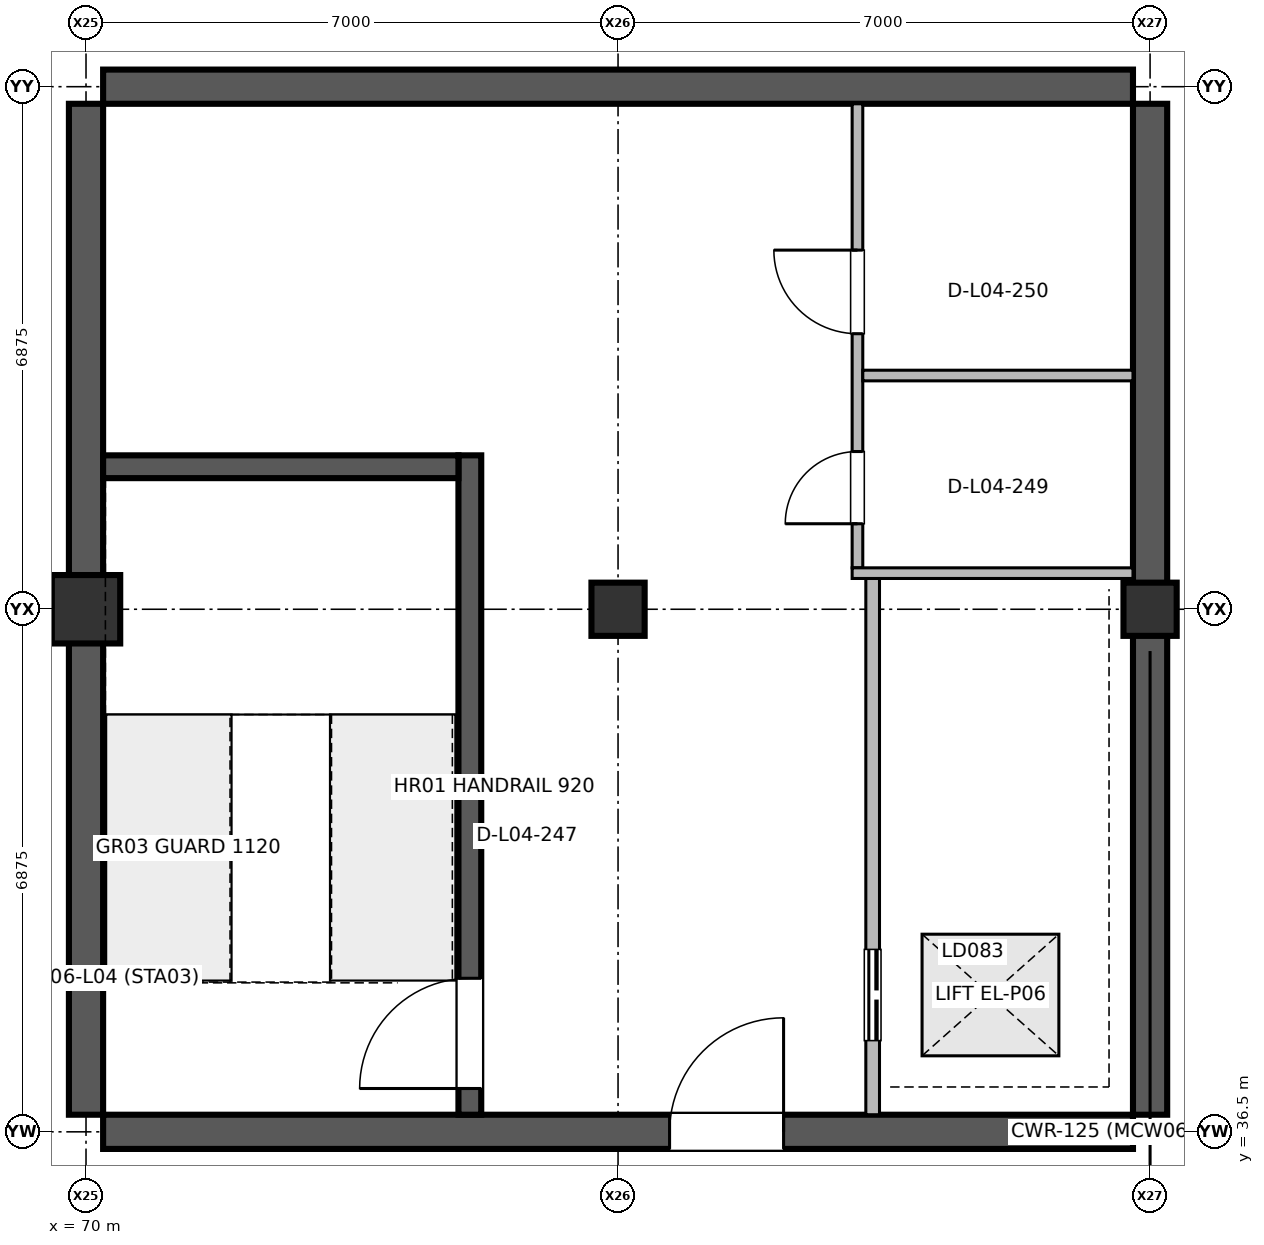
"""IFC4 building model, lengths in metres.
Left out: names, types, materials, properties, quantities, classifications, styles, units other than length and angle.
Written with IfcOpenShell. Run it as: python <this file> out.ifc"""

import sys

from ifc_helpers import new_model, si_unit, direction, frame, frame_2d, origin, origin_2d, place, context, subcontext, project, spatial, rectangle, extrude, element, fill, save


model = new_model("IFC4")
c1 = context("Model", 3, precision=1e-05, world=origin(), true_north=direction((0.0, 1.0)))
c2 = subcontext(c1, "Body", "Model", "MODEL_VIEW")
j1 = project(units=[si_unit("LENGTHUNIT", "METRE"), si_unit("PLANEANGLEUNIT", "RADIAN")], contexts=[c1])
p1 = place(None, origin())
s1 = spatial("IfcSite", under=j1, at=p1, CompositionType="ELEMENT")
p2 = place(p1, origin())
s2 = spatial("IfcBuilding", under=s1, at=p2, CompositionType="ELEMENT")
p3 = place(p2, frame((0.0, 0.0, 16.2)))
s3 = spatial("IfcBuildingStorey", under=s2, at=p3, CompositionType="ELEMENT", Elevation=16.2)
p4 = place(p3, frame((70.0, 43.375, 0.0), z_axis=(0.0, 0.0, 1.0), x_axis=(1.0, 0.0, 0.0)))
e1 = element("IfcColumn", 1, at=p4, inside=s3, PredefinedType="COLUMN", context=c2, shape_type="SweptSolid", body=[
    extrude(rectangle(XDim=0.9, YDim=0.9, at=origin_2d()), origin(), (0.0, 0.0, 1.0), 4.798),
])
p5 = place(p3, frame((77.0, 43.375, 0.0), z_axis=(0.0, 0.0, 1.0), x_axis=(1.0, 0.0, 0.0)))
e2 = element("IfcColumn", 2, at=p5, inside=s3, PredefinedType="COLUMN", context=c2, shape_type="SweptSolid", body=[
    extrude(rectangle(XDim=0.7, YDim=0.7, at=origin_2d()), origin(), (0.0, 0.0, 1.0), 4.6),
])
p6 = place(p3, frame((84.0, 43.375, 0.0), z_axis=(0.0, 0.0, 1.0), x_axis=(1.0, 0.0, 0.0)))
e3 = element("IfcColumn", 3, at=p6, inside=s3, PredefinedType="COLUMN", context=c2, shape_type="SweptSolid", body=[
    extrude(rectangle(XDim=0.7, YDim=0.7, at=origin_2d()), origin(), (0.0, 0.0, 1.0), 4.798),
])
for number, where, z_axis, x_axis in (
    (4, (70.0, 36.725, 0.0), (0.0, 0.0, 1.0), (0.0, 1.0, 0.0)),
    (5, (84.0, 36.725, 0.0), (0.0, 0.0, 1.0), (0.0, 1.0, 0.0)),
):
    element("IfcWall", number, at=place(p3, frame(where, z_axis=z_axis, x_axis=x_axis)), inside=s3, PredefinedType="SHEAR", context=c2, shape_type="SweptSolid", body=[
        extrude(rectangle(XDim=13.3, YDim=0.45, at=frame_2d((6.65, 0.0))), origin(), (0.0, 0.0, 1.0), 4.6),
    ])
p7 = place(p3, frame((70.225, 36.5, 0.0), z_axis=(0.0, 0.0, 1.0), x_axis=(1.0, 0.0, 0.0)))
e6 = element("IfcWall", 6, at=p7, inside=s3, PredefinedType="SHEAR", context=c2, shape_type="SweptSolid", body=[
    extrude(rectangle(XDim=13.55, YDim=0.45, at=frame_2d((6.775, 0.0))), origin(), (0.0, 0.0, 1.0), 4.6),
])
p8 = place(p7, frame((7.453, 0.0, 0.0)))
e7 = element("IfcOpeningElement", 7, at=p8, cuts=e6, PredefinedType="OPENING", context=c2, shape_type="SweptSolid", body=[
    extrude(rectangle(XDim=1.5, YDim=2.2, at=frame_2d((0.75, 1.1))), frame((0.0, 0.235, 0.0), z_axis=(0.0, -1.0, 0.0), x_axis=(1.0, 0.0, 0.0)), (0.0, 0.0, 1.0), 0.47),
])
p9 = place(p3, frame((70.225, 50.25, 0.0), z_axis=(0.0, 0.0, 1.0), x_axis=(1.0, 0.0, 0.0)))
e8 = element("IfcWall", 8, at=p9, inside=s3, PredefinedType="SHEAR", context=c2, shape_type="SweptSolid", body=[
    extrude(rectangle(XDim=13.55, YDim=0.45, at=frame_2d((6.775, 0.0))), origin(), (0.0, 0.0, 1.0), 4.6),
])
p10 = place(p3, frame((75.05, 36.725, 0.0), z_axis=(0.0, 0.0, 1.0), x_axis=(0.0, 1.0, 0.0)))
e9 = element("IfcWall", 9, at=p10, inside=s3, PredefinedType="SHEAR", context=c2, shape_type="SweptSolid", body=[
    extrude(rectangle(XDim=8.675, YDim=0.3, at=frame_2d((4.337, 0.0))), origin(), (0.0, 0.0, 1.0), 4.6),
])
p11 = place(p10, frame((0.345, 0.0, 0.0)))
e10 = element("IfcOpeningElement", 10, at=p11, cuts=e9, PredefinedType="OPENING", context=c2, shape_type="SweptSolid", body=[
    extrude(rectangle(XDim=1.45, YDim=2.2, at=frame_2d((0.725, 1.1))), frame((0.0, 0.16, 0.0), z_axis=(0.0, -1.0, 0.0), x_axis=(1.0, 0.0, 0.0)), (0.0, 0.0, 1.0), 0.32),
])
p12 = place(p3, frame((80.35, 36.725, 0.0), z_axis=(0.0, 0.0, 1.0), x_axis=(0.0, 1.0, 0.0)))
e11 = element("IfcWall", 11, at=p12, inside=s3, PredefinedType="PARTITIONING", context=c2, shape_type="SweptSolid", body=[
    extrude(rectangle(XDim=7.055, YDim=0.18, at=frame_2d((3.527, 0.0))), origin(), (0.0, 0.0, 1.0), 3.82),
])
p13 = place(p12, frame((0.975, 0.0, 0.0)))
e12 = element("IfcOpeningElement", 12, at=p13, cuts=e11, PredefinedType="OPENING", context=c2, shape_type="SweptSolid", body=[
    extrude(rectangle(XDim=1.2, YDim=2.25, at=frame_2d((0.6, 1.125))), frame((0.0, 0.1, 0.0), z_axis=(0.0, -1.0, 0.0), x_axis=(1.0, 0.0, 0.0)), (0.0, 0.0, 1.0), 0.2),
])
p14 = place(p3, frame((80.15, 43.92, 0.0), z_axis=(0.0, 0.0, 1.0), x_axis=(0.0, 1.0, 0.0)))
e13 = element("IfcWall", 13, at=p14, inside=s3, PredefinedType="PARTITIONING", context=c2, shape_type="SweptSolid", body=[
    extrude(rectangle(XDim=6.105, YDim=0.14, at=frame_2d((3.052, 0.0))), origin(), (0.0, 0.0, 1.0), 3.82),
])
p15 = place(p14, frame((0.58, 0.0, 0.0)))
e14 = element("IfcOpeningElement", 14, at=p15, cuts=e13, PredefinedType="OPENING", context=c2, shape_type="SweptSolid", body=[
    extrude(rectangle(XDim=0.95, YDim=2.15, at=frame_2d((0.475, 1.075))), frame((0.0, 0.08, 0.0), z_axis=(0.0, -1.0, 0.0), x_axis=(1.0, 0.0, 0.0)), (0.0, 0.0, 1.0), 0.16),
])
p16 = place(p14, frame((3.08, 0.0, 0.0)))
e15 = element("IfcOpeningElement", 15, at=p16, cuts=e13, PredefinedType="OPENING", context=c2, shape_type="SweptSolid", body=[
    extrude(rectangle(XDim=1.1, YDim=2.15, at=frame_2d((0.55, 1.075))), frame((0.0, 0.08, 0.0), z_axis=(0.0, -1.0, 0.0), x_axis=(1.0, 0.0, 0.0)), (0.0, 0.0, 1.0), 0.16),
])
p17 = place(p3, frame((80.08, 43.85, 0.0), z_axis=(0.0, 0.0, 1.0), x_axis=(1.0, 0.0, 0.0)))
e16 = element("IfcWall", 16, at=p17, inside=s3, PredefinedType="PARTITIONING", context=c2, shape_type="SweptSolid", body=[
    extrude(rectangle(XDim=3.695, YDim=0.14, at=frame_2d((1.847, 0.0))), origin(), (0.0, 0.0, 1.0), 3.82),
])
p18 = place(p3, frame((80.22, 46.45, 0.0), z_axis=(0.0, 0.0, 1.0), x_axis=(1.0, 0.0, 0.0)))
e17 = element("IfcWall", 17, at=p18, inside=s3, PredefinedType="PARTITIONING", context=c2, shape_type="SweptSolid", body=[
    extrude(rectangle(XDim=3.555, YDim=0.14, at=frame_2d((1.777, 0.0))), origin(), (0.0, 0.0, 1.0), 3.82),
])
p19 = place(p3, frame((70.225, 45.25, 0.0), z_axis=(0.0, 0.0, 1.0), x_axis=(1.0, 0.0, 0.0)))
e18 = element("IfcWall", 18, at=p19, inside=s3, PredefinedType="SHEAR", context=c2, shape_type="SweptSolid", body=[
    extrude(rectangle(XDim=4.675, YDim=0.3, at=frame_2d((2.337, 0.0))), origin(), (0.0, 0.0, 1.0), 4.6),
])
p20 = place(p8, origin())
e19 = element("IfcDoor", 19, at=p20, inside=s3, OperationType="SINGLE_SWING_RIGHT", PredefinedType="DOOR", context=c2, shape_type="SweptSolid", body=[
    extrude(rectangle(XDim=1.5, YDim=2.2, at=frame_2d((0.75, 1.1))), frame((0.0, 0.025, 0.0), z_axis=(0.0, -1.0, 0.0), x_axis=(1.0, 0.0, 0.0)), (0.0, 0.0, 1.0), 0.05),
])
fill(e7, e19)
p21 = place(p11, origin())
e20 = element("IfcDoor", 20, at=p21, inside=s3, OperationType="SINGLE_SWING_LEFT", PredefinedType="DOOR", context=c2, shape_type="SweptSolid", body=[
    extrude(rectangle(XDim=1.45, YDim=2.2, at=frame_2d((0.725, 1.1))), frame((0.0, 0.025, 0.0), z_axis=(0.0, -1.0, 0.0), x_axis=(1.0, 0.0, 0.0)), (0.0, 0.0, 1.0), 0.05),
])
fill(e10, e20)
p22 = place(p13, origin())
e21 = element("IfcDoor", 21, at=p22, inside=s3, OperationType="DOUBLE_DOOR_SLIDING", PredefinedType="DOOR", context=c2, shape_type="SweptSolid", body=[
    extrude(rectangle(XDim=1.2, YDim=2.25, at=frame_2d((0.6, 1.125))), frame((0.0, 0.025, 0.0), z_axis=(0.0, -1.0, 0.0), x_axis=(1.0, 0.0, 0.0)), (0.0, 0.0, 1.0), 0.05),
])
fill(e12, e21)
p23 = place(p15, origin())
e22 = element("IfcDoor", 22, at=p23, inside=s3, OperationType="SINGLE_SWING_LEFT", PredefinedType="DOOR", context=c2, shape_type="SweptSolid", body=[
    extrude(rectangle(XDim=0.95, YDim=2.15, at=frame_2d((0.475, 1.075))), frame((0.0, 0.025, 0.0), z_axis=(0.0, -1.0, 0.0), x_axis=(1.0, 0.0, 0.0)), (0.0, 0.0, 1.0), 0.05),
])
fill(e14, e22)
p24 = place(p16, origin())
e23 = element("IfcDoor", 23, at=p24, inside=s3, OperationType="SINGLE_SWING_RIGHT", PredefinedType="DOOR", context=c2, shape_type="SweptSolid", body=[
    extrude(rectangle(XDim=1.1, YDim=2.15, at=frame_2d((0.55, 1.075))), frame((0.0, 0.025, 0.0), z_axis=(0.0, -1.0, 0.0), x_axis=(1.0, 0.0, 0.0)), (0.0, 0.0, 1.0), 0.05),
])
fill(e15, e23)
save(model, sys.argv[1])
